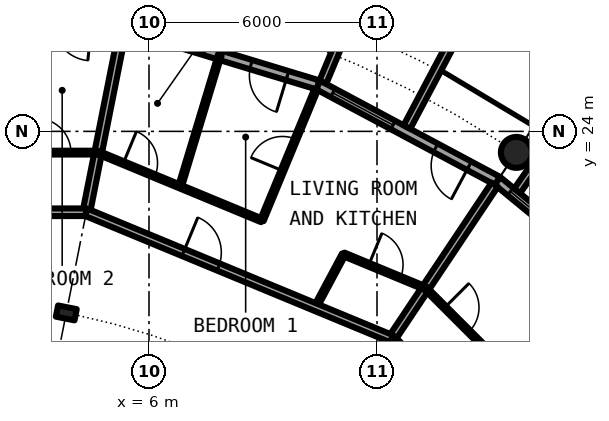
"""IFC4 building model, lengths in metres.
Left out: names, types, materials, properties, quantities, classifications, styles, units other than length and angle.
Written with IfcOpenShell. Run it as: python <this file> out.ifc"""

import sys

from ifc_helpers import new_model, si_unit, direction, frame, frame_2d, origin, origin_2d, place, context, subcontext, project, spatial, rectangle, hollow_circle, i_section, extrude, element, fill, save


model = new_model("IFC4")
c1 = context("Model", 3, precision=1e-05, world=origin(), true_north=direction((0.0, 1.0)))
c2 = subcontext(c1, "Body", "Model", "MODEL_VIEW")
j1 = project(units=[si_unit("LENGTHUNIT", "METRE"), si_unit("PLANEANGLEUNIT", "RADIAN")], contexts=[c1])
p1 = place(None, origin())
s1 = spatial("IfcSite", under=j1, at=p1, CompositionType="ELEMENT")
p2 = place(p1, origin())
s2 = spatial("IfcBuilding", under=s1, at=p2, CompositionType="ELEMENT")
p3 = place(p2, frame((0.0, 0.0, 170.75)))
s3 = spatial("IfcBuildingStorey", under=s2, at=p3, CompositionType="ELEMENT", Elevation=170.75)
p4 = place(p3, frame((15.667, 23.448, 0.0), z_axis=(0.0, 0.0, 1.0), x_axis=(1.0, 0.0, 0.0)))
e1 = element("IfcColumn", 1, at=p4, inside=s3, PredefinedType="COLUMN", context=c2, shape_type="SweptSolid", body=[
    extrude(hollow_circle(Radius=0.406, WallThickness=0.04, at=origin_2d()), origin(), (0.0, 0.0, 1.0), 3.05),
])
p5 = place(p3, frame((3.824, 19.223, 0.0), z_axis=(0.0, 0.0, 1.0), x_axis=(0.195090322016, 0.980785280403, 0.0)))
e2 = element("IfcColumn", 2, at=p5, inside=s3, PredefinedType="COLUMN", context=c2, shape_type="SweptSolid", body=[
    extrude(i_section(OverallWidth=0.3, OverallDepth=0.5, WebThickness=0.014, FlangeThickness=0.028, FilletRadius=0.027, at=origin_2d()), origin(), (0.0, 0.0, 1.0), 3.05),
])
p6 = place(p3, frame((19.304, 19.304, 0.0), z_axis=(0.0, 0.0, 1.0), x_axis=(-0.773019449054, 0.634382322723, 0.0)))
e3 = element("IfcWall", 3, at=p6, inside=s3, PredefinedType="SOLIDWALL", context=c2, shape_type="SweptSolid", body=[
    extrude(rectangle(XDim=5.352, YDim=0.25, at=frame_2d((2.676, 0.0))), origin(), (0.0, 0.0, 1.0), 2.7),
])
p7 = place(p6, frame((0.841, 0.0, 0.0)))
e4 = element("IfcOpeningElement", 4, at=p7, cuts=e3, PredefinedType="OPENING", context=c2, shape_type="SweptSolid", body=[
    extrude(rectangle(XDim=1.0, YDim=2.2, at=frame_2d((0.5, 1.1))), frame((0.0, 0.135, 0.0), z_axis=(0.0, -1.0, 0.0), x_axis=(1.0, 0.0, 0.0)), (0.0, 0.0, 1.0), 0.27),
])
p8 = place(p6, frame((3.111, 0.0, 0.3)))
e5 = element("IfcOpeningElement", 5, at=p8, cuts=e3, PredefinedType="OPENING", context=c2, shape_type="SweptSolid", body=[
    extrude(rectangle(XDim=1.8, YDim=2.1, at=frame_2d((0.9, 1.05))), frame((0.0, 0.135, 0.0), z_axis=(0.0, -1.0, 0.0), x_axis=(1.0, 0.0, 0.0)), (0.0, 0.0, 1.0), 0.27),
])
p9 = place(p3, frame((15.688, 22.433, -0.03), z_axis=(0.0, 0.0, 1.0), x_axis=(0.573260687834, 0.819373043115, 0.0)))
e6 = element("IfcWall", 6, at=p9, inside=s3, PredefinedType="SOLIDWALL", context=c2, shape_type="SweptSolid", body=[
    extrude(rectangle(XDim=2.925, YDim=0.2, at=frame_2d((1.463, 0.0))), origin(), (0.0, 0.0, 1.0), 2.73),
])
p10 = place(p3, frame((15.167, 22.699, 0.0), z_axis=(0.0, 0.0, 1.0), x_axis=(-0.881915646801, 0.471407246368, 0.0)))
e7 = element("IfcWall", 7, at=p10, inside=s3, PredefinedType="SOLIDWALL", context=c2, shape_type="SweptSolid", body=[
    extrude(rectangle(XDim=5.352, YDim=0.25, at=frame_2d((2.676, 0.0))), origin(), (0.0, 0.0, 1.0), 2.7),
])
p11 = place(p10, frame((0.841, 0.0, 0.0)))
e8 = element("IfcOpeningElement", 8, at=p11, cuts=e7, PredefinedType="OPENING", context=c2, shape_type="SweptSolid", body=[
    extrude(rectangle(XDim=1.0, YDim=2.2, at=frame_2d((0.5, 1.1))), frame((0.0, 0.135, 0.0), z_axis=(0.0, -1.0, 0.0), x_axis=(1.0, 0.0, 0.0)), (0.0, 0.0, 1.0), 0.27),
])
p12 = place(p10, frame((3.111, 0.0, 0.3)))
e9 = element("IfcOpeningElement", 9, at=p12, cuts=e7, PredefinedType="OPENING", context=c2, shape_type="SweptSolid", body=[
    extrude(rectangle(XDim=1.8, YDim=2.1, at=frame_2d((0.9, 1.05))), frame((0.0, 0.135, 0.0), z_axis=(0.0, -1.0, 0.0), x_axis=(1.0, 0.0, 0.0)), (0.0, 0.0, 1.0), 0.27),
])
p13 = place(p3, frame((12.787, 24.113, -0.03), z_axis=(0.0, 0.0, 1.0), x_axis=(0.468365282436, 0.883534924159, 0.0)))
e10 = element("IfcWall", 10, at=p13, inside=s3, PredefinedType="SOLIDWALL", context=c2, shape_type="SweptSolid", body=[
    extrude(rectangle(XDim=3.006, YDim=0.2, at=frame_2d((1.503, 0.0))), origin(), (0.0, 0.0, 1.0), 2.73),
])
p14 = place(p3, frame((10.575, 25.295, -0.03), z_axis=(0.0, 0.0, 1.0), x_axis=(0.385697364644, 0.922625353492, 0.0)))
e11 = element("IfcWall", 11, at=p14, inside=s3, PredefinedType="SOLIDWALL", context=c2, shape_type="SweptSolid", body=[
    extrude(rectangle(XDim=2.883, YDim=0.2, at=frame_2d((1.442, 0.0))), origin(), (0.0, 0.0, 1.0), 2.73),
])
p15 = place(p3, frame((10.447, 25.222, 0.0), z_axis=(0.0, 0.0, 1.0), x_axis=(-0.956965678721, 0.290201119486, 0.0)))
e12 = element("IfcWall", 12, at=p15, inside=s3, PredefinedType="SOLIDWALL", context=c2, shape_type="SweptSolid", body=[
    extrude(rectangle(XDim=5.351, YDim=0.25, at=frame_2d((2.676, 0.0))), origin(), (0.0, 0.0, 1.0), 2.7),
])
p16 = place(p15, frame((0.841, 0.0, 0.0)))
e13 = element("IfcOpeningElement", 13, at=p16, cuts=e12, PredefinedType="OPENING", context=c2, shape_type="SweptSolid", body=[
    extrude(rectangle(XDim=1.0, YDim=2.2, at=frame_2d((0.5, 1.1))), frame((0.0, 0.135, 0.0), z_axis=(0.0, -1.0, 0.0), x_axis=(1.0, 0.0, 0.0)), (0.0, 0.0, 1.0), 0.27),
])
p17 = place(p15, frame((3.111, 0.0, 0.3)))
e14 = element("IfcOpeningElement", 14, at=p17, cuts=e12, PredefinedType="OPENING", context=c2, shape_type="SweptSolid", body=[
    extrude(rectangle(XDim=1.8, YDim=2.1, at=frame_2d((0.9, 1.05))), frame((0.0, 0.135, 0.0), z_axis=(0.0, -1.0, 0.0), x_axis=(1.0, 0.0, 0.0)), (0.0, 0.0, 1.0), 0.27),
])
p18 = place(p3, frame((10.38, 19.374, 0.0), z_axis=(0.0, 0.0, 1.0), x_axis=(0.472002235476, 0.881597351236, 0.0)))
e15 = element("IfcWall", 15, at=p18, inside=s3, PredefinedType="PARTITIONING", context=c2, shape_type="SweptSolid", body=[
    extrude(rectangle(XDim=1.577, YDim=0.1, at=frame_2d((0.788, 0.0))), origin(), (0.0, 0.0, 1.0), 2.7),
])
p19 = place(p3, frame((4.351, 21.872, 0.0), z_axis=(0.0, 0.0, 1.0), x_axis=(0.195075825861, 0.980788163756, 0.0)))
e16 = element("IfcWall", 16, at=p19, inside=s3, PredefinedType="PARTITIONING", context=c2, shape_type="SweptSolid", body=[
    extrude(rectangle(XDim=4.875, YDim=0.2, at=frame_2d((2.438, 0.0))), origin(), (0.0, 0.0, 1.0), 2.7),
])
p20 = place(p3, frame((6.817, 22.549, 0.0), z_axis=(0.0, 0.0, 1.0), x_axis=(0.289439829793, 0.957196210256, 0.0)))
e17 = element("IfcWall", 17, at=p20, inside=s3, PredefinedType="PARTITIONING", context=c2, shape_type="SweptSolid", body=[
    extrude(rectangle(XDim=3.618, YDim=0.1, at=frame_2d((1.809, 0.0))), origin(), (0.0, 0.0, 1.0), 2.7),
])
p21 = place(p3, frame((8.97, 21.657, 0.0), z_axis=(0.0, 0.0, 1.0), x_axis=(0.382761856702, 0.923847044188, 0.0)))
e18 = element("IfcWall", 18, at=p21, inside=s3, PredefinedType="PARTITIONING", context=c2, shape_type="SweptSolid", body=[
    extrude(rectangle(XDim=3.733, YDim=0.1, at=frame_2d((1.867, 0.0))), origin(), (0.0, 0.0, 1.0), 2.7),
])
p22 = place(p21, frame((1.417, 0.0, 0.0)))
e19 = element("IfcOpeningElement", 19, at=p22, cuts=e18, PredefinedType="OPENING", context=c2, shape_type="SweptSolid", body=[
    extrude(rectangle(XDim=0.9, YDim=2.3, at=frame_2d((0.45, 1.15))), frame((0.0, 0.06, 0.0), z_axis=(0.0, -1.0, 0.0), x_axis=(1.0, 0.0, 0.0)), (0.0, 0.0, 1.0), 0.12),
])
p23 = place(p3, frame((12.388, 18.543, 0.0), z_axis=(0.0, 0.0, 1.0), x_axis=(0.55555521993, 0.831479643532, 0.0)))
e20 = element("IfcWall", 20, at=p23, inside=s3, PredefinedType="PARTITIONING", context=c2, shape_type="SweptSolid", body=[
    extrude(rectangle(XDim=4.875, YDim=0.2, at=frame_2d((2.437, 0.0))), origin(), (0.0, 0.0, 1.0), 2.7),
])
p24 = place(p3, frame((-4.351, 21.872, 0.0), z_axis=(0.0, 0.0, 1.0), x_axis=(1.0, 0.0, 0.0)))
e21 = element("IfcWall", 21, at=p24, inside=s3, PredefinedType="PARTITIONING", context=c2, shape_type="SweptSolid", body=[
    extrude(rectangle(XDim=8.702, YDim=0.2, at=frame_2d((4.351, 0.0))), origin(), (0.0, 0.0, 1.0), 2.7),
])
p25 = place(p24, frame((4.939, 0.0, 0.0)))
e22 = element("IfcOpeningElement", 22, at=p25, cuts=e21, PredefinedType="OPENING", context=c2, shape_type="SweptSolid", body=[
    extrude(rectangle(XDim=1.0, YDim=2.3, at=frame_2d((0.5, 1.15))), frame((0.0, 0.11, 0.0), z_axis=(0.0, -1.0, 0.0), x_axis=(1.0, 0.0, 0.0)), (0.0, 0.0, 1.0), 0.22),
])
p26 = place(p3, frame((4.347, 21.872, 0.0), z_axis=(0.0, 0.0, 1.0), x_axis=(0.923921124994, -0.382583003792, 0.0)))
e23 = element("IfcWall", 23, at=p26, inside=s3, PredefinedType="PARTITIONING", context=c2, shape_type="SweptSolid", body=[
    extrude(rectangle(XDim=8.704, YDim=0.2, at=frame_2d((4.352, 0.0))), origin(), (0.0, 0.0, 1.0), 2.7),
])
p27 = place(p26, frame((2.767, 0.0, 0.0)))
e24 = element("IfcOpeningElement", 24, at=p27, cuts=e23, PredefinedType="OPENING", context=c2, shape_type="SweptSolid", body=[
    extrude(rectangle(XDim=1.0, YDim=2.3, at=frame_2d((0.5, 1.15))), frame((0.0, 0.11, 0.0), z_axis=(0.0, -1.0, 0.0), x_axis=(1.0, 0.0, 0.0)), (0.0, 0.0, 1.0), 0.22),
])
p28 = place(p3, frame((12.389, 18.542, 0.0), z_axis=(0.0, 0.0, 1.0), x_axis=(0.707106781187, -0.707106781187, 0.0)))
e25 = element("IfcWall", 25, at=p28, inside=s3, PredefinedType="PARTITIONING", context=c2, shape_type="SweptSolid", body=[
    extrude(rectangle(XDim=8.702, YDim=0.2, at=frame_2d((4.351, 0.0))), origin(), (0.0, 0.0, 1.0), 2.7),
])
p29 = place(p28, frame((4.938, 0.0, 0.0)))
e26 = element("IfcOpeningElement", 26, at=p29, cuts=e25, PredefinedType="OPENING", context=c2, shape_type="SweptSolid", body=[
    extrude(rectangle(XDim=1.0, YDim=2.3, at=frame_2d((0.5, 1.15))), frame((0.0, 0.11, 0.0), z_axis=(0.0, -1.0, 0.0), x_axis=(1.0, 0.0, 0.0)), (0.0, 0.0, 1.0), 0.22),
])
p30 = place(p3, frame((0.0, 23.441, 0.0), z_axis=(0.0, 0.0, 1.0), x_axis=(1.0, 0.0, 0.0)))
e27 = element("IfcWall", 27, at=p30, inside=s3, PredefinedType="PARTITIONING", context=c2, shape_type="SweptSolid", body=[
    extrude(rectangle(XDim=4.663, YDim=0.1, at=frame_2d((2.332, 0.0))), origin(), (0.0, 0.0, 1.0), 2.7),
])
p31 = place(p30, frame((3.047, 0.0, 0.0)))
e28 = element("IfcOpeningElement", 28, at=p31, cuts=e27, PredefinedType="OPENING", context=c2, shape_type="SweptSolid", body=[
    extrude(rectangle(XDim=0.9, YDim=2.3, at=frame_2d((0.45, 1.15))), frame((0.0, 0.06, 0.0), z_axis=(0.0, -1.0, 0.0), x_axis=(1.0, 0.0, 0.0)), (0.0, 0.0, 1.0), 0.12),
])
p32 = place(p3, frame((4.66, 23.441, 0.0), z_axis=(0.0, 0.0, 1.0), x_axis=(0.923920484476, -0.38258455061, 0.0)))
e29 = element("IfcWall", 29, at=p32, inside=s3, PredefinedType="PARTITIONING", context=c2, shape_type="SweptSolid", body=[
    extrude(rectangle(XDim=4.663, YDim=0.1, at=frame_2d((2.332, 0.0))), origin(), (0.0, 0.0, 1.0), 2.7),
])
p33 = place(p32, frame((0.72, 0.0, 0.0)))
e30 = element("IfcOpeningElement", 30, at=p33, cuts=e29, PredefinedType="OPENING", context=c2, shape_type="SweptSolid", body=[
    extrude(rectangle(XDim=0.9, YDim=2.3, at=frame_2d((0.45, 1.15))), frame((0.0, 0.06, 0.0), z_axis=(0.0, -1.0, 0.0), x_axis=(1.0, 0.0, 0.0)), (0.0, 0.0, 1.0), 0.12),
])
p34 = place(p3, frame((11.124, 20.764, 0.0), z_axis=(0.0, 0.0, 1.0), x_axis=(0.923938991376, -0.382539854414, 0.0)))
e31 = element("IfcWall", 31, at=p34, inside=s3, PredefinedType="PARTITIONING", context=c2, shape_type="SweptSolid", body=[
    extrude(rectangle(XDim=2.331, YDim=0.1, at=frame_2d((1.166, 0.0))), origin(), (0.0, 0.0, 1.0), 2.7),
])
p35 = place(p34, frame((0.716, 0.0, 0.0)))
e32 = element("IfcOpeningElement", 32, at=p35, cuts=e31, PredefinedType="OPENING", context=c2, shape_type="SweptSolid", body=[
    extrude(rectangle(XDim=0.9, YDim=2.3, at=frame_2d((0.45, 1.15))), frame((0.0, 0.06, 0.0), z_axis=(0.0, -1.0, 0.0), x_axis=(1.0, 0.0, 0.0)), (0.0, 0.0, 1.0), 0.12),
])
p36 = place(p3, frame((13.283, 19.867, 0.0), z_axis=(0.0, 0.0, 1.0), x_axis=(0.707106781187, -0.707106781187, 0.0)))
e33 = element("IfcWall", 33, at=p36, inside=s3, PredefinedType="PARTITIONING", context=c2, shape_type="SweptSolid", body=[
    extrude(rectangle(XDim=2.332, YDim=0.1, at=frame_2d((1.166, 0.0))), origin(), (0.0, 0.0, 1.0), 2.7),
])
p37 = place(p36, frame((0.709, 0.0, 0.0)))
e34 = element("IfcOpeningElement", 34, at=p37, cuts=e33, PredefinedType="OPENING", context=c2, shape_type="SweptSolid", body=[
    extrude(rectangle(XDim=0.9, YDim=2.3, at=frame_2d((0.45, 1.15))), frame((0.0, 0.06, 0.0), z_axis=(0.0, -1.0, 0.0), x_axis=(1.0, 0.0, 0.0)), (0.0, 0.0, 1.0), 0.12),
])
p38 = place(p8, origin())
e35 = element("IfcWindow", 35, at=p38, inside=s3, PartitioningType="SINGLE_PANEL", PredefinedType="WINDOW", context=c2, shape_type="SweptSolid", body=[
    extrude(rectangle(XDim=1.8, YDim=2.1, at=frame_2d((0.9, 1.05))), frame((0.0, 0.03, 0.0), z_axis=(0.0, -1.0, 0.0), x_axis=(1.0, 0.0, 0.0)), (0.0, 0.0, 1.0), 0.06),
])
fill(e5, e35)
p39 = place(p11, origin())
e36 = element("IfcDoor", 36, at=p39, inside=s3, OperationType="SINGLE_SWING_LEFT", PredefinedType="DOOR", context=c2, shape_type="SweptSolid", body=[
    extrude(rectangle(XDim=1.0, YDim=2.2, at=frame_2d((0.5, 1.1))), frame((0.0, 0.025, 0.0), z_axis=(0.0, -1.0, 0.0), x_axis=(1.0, 0.0, 0.0)), (0.0, 0.0, 1.0), 0.05),
])
fill(e8, e36)
p40 = place(p12, origin())
e37 = element("IfcWindow", 37, at=p40, inside=s3, PartitioningType="SINGLE_PANEL", PredefinedType="WINDOW", context=c2, shape_type="SweptSolid", body=[
    extrude(rectangle(XDim=1.8, YDim=2.1, at=frame_2d((0.9, 1.05))), frame((0.0, 0.03, 0.0), z_axis=(0.0, -1.0, 0.0), x_axis=(1.0, 0.0, 0.0)), (0.0, 0.0, 1.0), 0.06),
])
fill(e9, e37)
p41 = place(p16, origin())
e38 = element("IfcDoor", 38, at=p41, inside=s3, OperationType="SINGLE_SWING_LEFT", PredefinedType="DOOR", context=c2, shape_type="SweptSolid", body=[
    extrude(rectangle(XDim=1.0, YDim=2.2, at=frame_2d((0.5, 1.1))), frame((0.0, 0.025, 0.0), z_axis=(0.0, -1.0, 0.0), x_axis=(1.0, 0.0, 0.0)), (0.0, 0.0, 1.0), 0.05),
])
fill(e13, e38)
p42 = place(p37, origin())
e39 = element("IfcDoor", 39, at=p42, inside=s3, OperationType="SINGLE_SWING_LEFT", PredefinedType="DOOR", context=c2, shape_type="SweptSolid", body=[
    extrude(rectangle(XDim=0.9, YDim=2.3, at=frame_2d((0.45, 1.15))), frame((0.0, 0.025, 0.0), z_axis=(0.0, -1.0, 0.0), x_axis=(1.0, 0.0, 0.0)), (0.0, 0.0, 1.0), 0.05),
])
fill(e34, e39)
p43 = place(p27, origin())
e40 = element("IfcDoor", 40, at=p43, inside=s3, OperationType="SINGLE_SWING_LEFT", PredefinedType="DOOR", context=c2, shape_type="SweptSolid", body=[
    extrude(rectangle(XDim=1.0, YDim=2.3, at=frame_2d((0.5, 1.15))), frame((0.0, 0.025, 0.0), z_axis=(0.0, -1.0, 0.0), x_axis=(1.0, 0.0, 0.0)), (0.0, 0.0, 1.0), 0.05),
])
fill(e24, e40)
p44 = place(p35, origin())
e41 = element("IfcDoor", 41, at=p44, inside=s3, OperationType="SINGLE_SWING_LEFT", PredefinedType="DOOR", context=c2, shape_type="SweptSolid", body=[
    extrude(rectangle(XDim=0.9, YDim=2.3, at=frame_2d((0.45, 1.15))), frame((0.0, 0.025, 0.0), z_axis=(0.0, -1.0, 0.0), x_axis=(1.0, 0.0, 0.0)), (0.0, 0.0, 1.0), 0.05),
])
fill(e32, e41)
p45 = place(p22, origin())
e42 = element("IfcDoor", 42, at=p45, inside=s3, OperationType="SINGLE_SWING_LEFT", PredefinedType="DOOR", context=c2, shape_type="SweptSolid", body=[
    extrude(rectangle(XDim=0.9, YDim=2.3, at=frame_2d((0.45, 1.15))), frame((0.0, 0.025, 0.0), z_axis=(0.0, -1.0, 0.0), x_axis=(1.0, 0.0, 0.0)), (0.0, 0.0, 1.0), 0.05),
])
fill(e19, e42)
p46 = place(p33, origin())
e43 = element("IfcDoor", 43, at=p46, inside=s3, OperationType="SINGLE_SWING_LEFT", PredefinedType="DOOR", context=c2, shape_type="SweptSolid", body=[
    extrude(rectangle(XDim=0.9, YDim=2.3, at=frame_2d((0.45, 1.15))), frame((0.0, 0.025, 0.0), z_axis=(0.0, -1.0, 0.0), x_axis=(1.0, 0.0, 0.0)), (0.0, 0.0, 1.0), 0.05),
])
fill(e30, e43)
p47 = place(p31, origin())
e44 = element("IfcDoor", 44, at=p47, inside=s3, OperationType="SINGLE_SWING_RIGHT", PredefinedType="DOOR", context=c2, shape_type="SweptSolid", body=[
    extrude(rectangle(XDim=0.9, YDim=2.3, at=frame_2d((0.45, 1.15))), frame((0.0, 0.025, 0.0), z_axis=(0.0, -1.0, 0.0), x_axis=(1.0, 0.0, 0.0)), (0.0, 0.0, 1.0), 0.05),
])
fill(e28, e44)
save(model, sys.argv[1])
